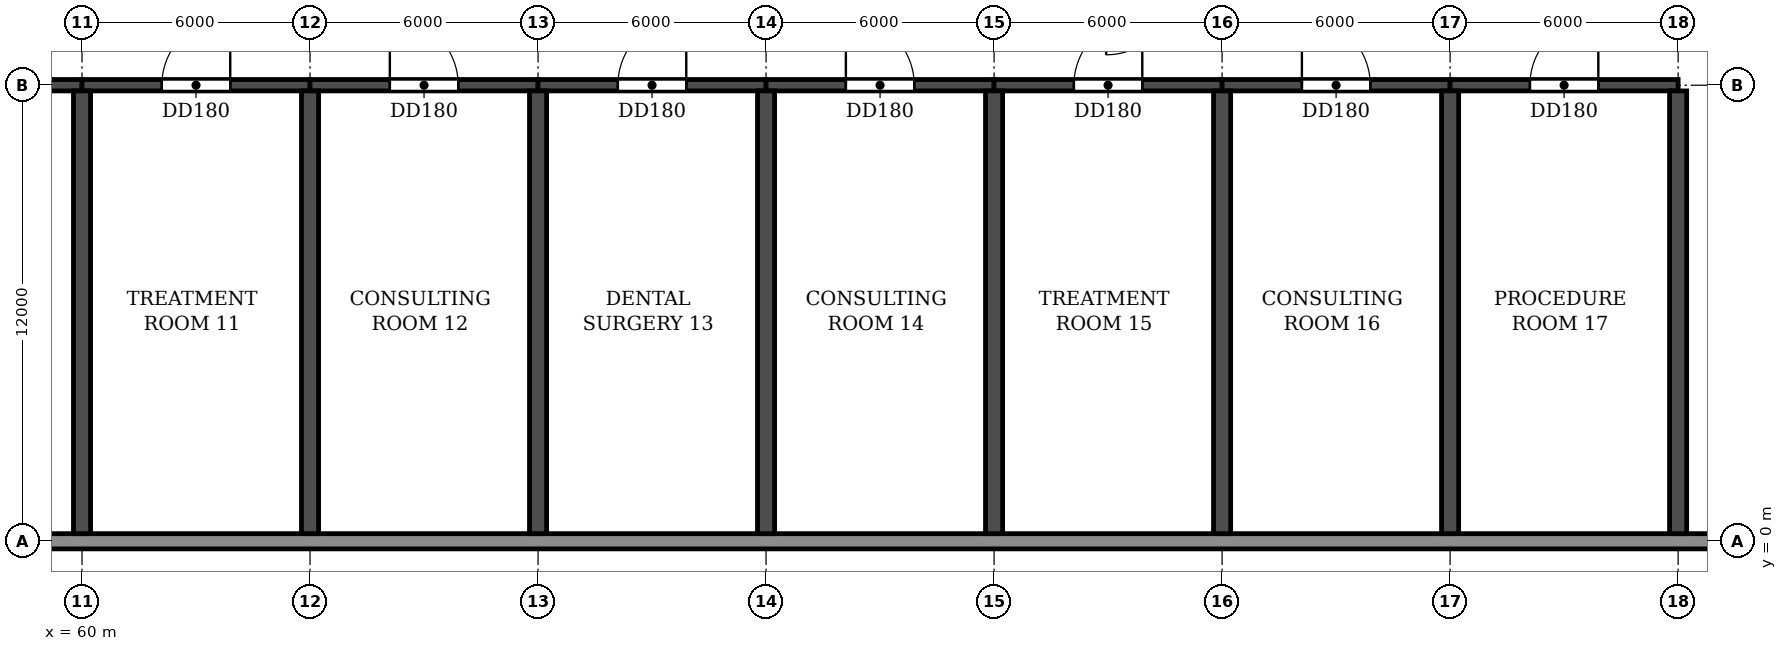
"""IFC4 building model, lengths in metres.
Left out: names, types, materials, properties, quantities, classifications, styles, units other than length and angle.
Written with IfcOpenShell. Run it as: python <this file> out.ifc"""

import sys

from ifc_helpers import new_model, si_unit, direction, frame, frame_2d, origin, place, context, subcontext, project, spatial, rectangle, extrude, element, fill, save


model = new_model("IFC4")
c1 = context("Model", 3, precision=1e-05, world=origin(), true_north=direction((0.0, 1.0)))
c2 = subcontext(c1, "Body", "Model", "MODEL_VIEW")
j1 = project(units=[si_unit("LENGTHUNIT", "METRE"), si_unit("PLANEANGLEUNIT", "RADIAN")], contexts=[c1])
p1 = place(None, origin())
s1 = spatial("IfcSite", under=j1, at=p1, CompositionType="ELEMENT")
p2 = place(p1, origin())
s2 = spatial("IfcBuilding", under=s1, at=p2, CompositionType="ELEMENT")
p3 = place(p2, frame((0.0, 0.0, 6.0)))
s3 = spatial("IfcBuildingStorey", under=s2, at=p3, CompositionType="ELEMENT", Elevation=6.0)
for number, where, z_axis, x_axis in (
    (1, (60.0, 0.2, 0.0), (0.0, 0.0, 1.0), (0.0, 1.0, 0.0)),
    (2, (66.0, 0.2, 0.0), (0.0, 0.0, 1.0), (0.0, 1.0, 0.0)),
    (3, (72.0, 0.2, 0.0), (0.0, 0.0, 1.0), (0.0, 1.0, 0.0)),
    (4, (78.0, 0.2, 0.0), (0.0, 0.0, 1.0), (0.0, 1.0, 0.0)),
    (5, (84.0, 0.2, 0.0), (0.0, 0.0, 1.0), (0.0, 1.0, 0.0)),
    (6, (90.0, 0.2, 0.0), (0.0, 0.0, 1.0), (0.0, 1.0, 0.0)),
    (7, (96.0, 0.2, 0.0), (0.0, 0.0, 1.0), (0.0, 1.0, 0.0)),
    (8, (102.0, 0.2, 0.0), (0.0, 0.0, 1.0), (0.0, 1.0, 0.0)),
):
    element("IfcWall", number, at=place(p3, frame(where, z_axis=z_axis, x_axis=x_axis)), inside=s3, PredefinedType="SHEAR", context=c2, shape_type="SweptSolid", body=[
        extrude(rectangle(XDim=11.65, YDim=0.45, at=frame_2d((5.825, 0.0))), origin(), (0.0, 0.0, 1.0), 4.52),
    ])
p4 = place(p3, frame((54.0, 12.0, 0.0), z_axis=(0.0, 0.0, 1.0), x_axis=(1.0, 0.0, 0.0)))
e9 = element("IfcWall", 9, at=p4, inside=s3, PredefinedType="SHEAR", context=c2, shape_type="SweptSolid", body=[
    extrude(rectangle(XDim=6.0, YDim=0.3, at=frame_2d((3.0, 0.0))), origin(), (0.0, 0.0, 1.0), 3.92),
])
p5 = place(p4, frame((2.1, 0.0, 0.0)))
e10 = element("IfcOpeningElement", 10, at=p5, cuts=e9, PredefinedType="OPENING", context=c2, shape_type="SweptSolid", body=[
    extrude(rectangle(XDim=1.8, YDim=2.1, at=frame_2d((0.9, 1.05))), frame((0.0, 0.16, 0.0), z_axis=(0.0, -1.0, 0.0), x_axis=(1.0, 0.0, 0.0)), (0.0, 0.0, 1.0), 0.32),
])
p6 = place(p3, frame((60.0, 12.0, 0.0), z_axis=(0.0, 0.0, 1.0), x_axis=(1.0, 0.0, 0.0)))
e11 = element("IfcWall", 11, at=p6, inside=s3, PredefinedType="SHEAR", context=c2, shape_type="SweptSolid", body=[
    extrude(rectangle(XDim=6.0, YDim=0.3, at=frame_2d((3.0, 0.0))), origin(), (0.0, 0.0, 1.0), 3.92),
])
p7 = place(p6, frame((2.1, 0.0, 0.0)))
e12 = element("IfcOpeningElement", 12, at=p7, cuts=e11, PredefinedType="OPENING", context=c2, shape_type="SweptSolid", body=[
    extrude(rectangle(XDim=1.8, YDim=2.1, at=frame_2d((0.9, 1.05))), frame((0.0, 0.16, 0.0), z_axis=(0.0, -1.0, 0.0), x_axis=(1.0, 0.0, 0.0)), (0.0, 0.0, 1.0), 0.32),
])
p8 = place(p3, frame((66.0, 12.0, 0.0), z_axis=(0.0, 0.0, 1.0), x_axis=(1.0, 0.0, 0.0)))
e13 = element("IfcWall", 13, at=p8, inside=s3, PredefinedType="SHEAR", context=c2, shape_type="SweptSolid", body=[
    extrude(rectangle(XDim=6.0, YDim=0.3, at=frame_2d((3.0, 0.0))), origin(), (0.0, 0.0, 1.0), 3.92),
])
p9 = place(p8, frame((2.1, 0.0, 0.0)))
e14 = element("IfcOpeningElement", 14, at=p9, cuts=e13, PredefinedType="OPENING", context=c2, shape_type="SweptSolid", body=[
    extrude(rectangle(XDim=1.8, YDim=2.1, at=frame_2d((0.9, 1.05))), frame((0.0, 0.16, 0.0), z_axis=(0.0, -1.0, 0.0), x_axis=(1.0, 0.0, 0.0)), (0.0, 0.0, 1.0), 0.32),
])
p10 = place(p3, frame((72.0, 12.0, 0.0), z_axis=(0.0, 0.0, 1.0), x_axis=(1.0, 0.0, 0.0)))
e15 = element("IfcWall", 15, at=p10, inside=s3, PredefinedType="SHEAR", context=c2, shape_type="SweptSolid", body=[
    extrude(rectangle(XDim=6.0, YDim=0.3, at=frame_2d((3.0, 0.0))), origin(), (0.0, 0.0, 1.0), 3.92),
])
p11 = place(p10, frame((2.1, 0.0, 0.0)))
e16 = element("IfcOpeningElement", 16, at=p11, cuts=e15, PredefinedType="OPENING", context=c2, shape_type="SweptSolid", body=[
    extrude(rectangle(XDim=1.8, YDim=2.1, at=frame_2d((0.9, 1.05))), frame((0.0, 0.16, 0.0), z_axis=(0.0, -1.0, 0.0), x_axis=(1.0, 0.0, 0.0)), (0.0, 0.0, 1.0), 0.32),
])
p12 = place(p3, frame((78.0, 12.0, 0.0), z_axis=(0.0, 0.0, 1.0), x_axis=(1.0, 0.0, 0.0)))
e17 = element("IfcWall", 17, at=p12, inside=s3, PredefinedType="SHEAR", context=c2, shape_type="SweptSolid", body=[
    extrude(rectangle(XDim=6.0, YDim=0.3, at=frame_2d((3.0, 0.0))), origin(), (0.0, 0.0, 1.0), 3.92),
])
p13 = place(p12, frame((2.1, 0.0, 0.0)))
e18 = element("IfcOpeningElement", 18, at=p13, cuts=e17, PredefinedType="OPENING", context=c2, shape_type="SweptSolid", body=[
    extrude(rectangle(XDim=1.8, YDim=2.1, at=frame_2d((0.9, 1.05))), frame((0.0, 0.16, 0.0), z_axis=(0.0, -1.0, 0.0), x_axis=(1.0, 0.0, 0.0)), (0.0, 0.0, 1.0), 0.32),
])
p14 = place(p3, frame((84.0, 12.0, 0.0), z_axis=(0.0, 0.0, 1.0), x_axis=(1.0, 0.0, 0.0)))
e19 = element("IfcWall", 19, at=p14, inside=s3, PredefinedType="SHEAR", context=c2, shape_type="SweptSolid", body=[
    extrude(rectangle(XDim=6.0, YDim=0.3, at=frame_2d((3.0, 0.0))), origin(), (0.0, 0.0, 1.0), 3.92),
])
p15 = place(p14, frame((2.1, 0.0, 0.0)))
e20 = element("IfcOpeningElement", 20, at=p15, cuts=e19, PredefinedType="OPENING", context=c2, shape_type="SweptSolid", body=[
    extrude(rectangle(XDim=1.8, YDim=2.1, at=frame_2d((0.9, 1.05))), frame((0.0, 0.16, 0.0), z_axis=(0.0, -1.0, 0.0), x_axis=(1.0, 0.0, 0.0)), (0.0, 0.0, 1.0), 0.32),
])
p16 = place(p3, frame((90.0, 12.0, 0.0), z_axis=(0.0, 0.0, 1.0), x_axis=(1.0, 0.0, 0.0)))
e21 = element("IfcWall", 21, at=p16, inside=s3, PredefinedType="SHEAR", context=c2, shape_type="SweptSolid", body=[
    extrude(rectangle(XDim=6.0, YDim=0.3, at=frame_2d((3.0, 0.0))), origin(), (0.0, 0.0, 1.0), 3.92),
])
p17 = place(p16, frame((2.1, 0.0, 0.0)))
e22 = element("IfcOpeningElement", 22, at=p17, cuts=e21, PredefinedType="OPENING", context=c2, shape_type="SweptSolid", body=[
    extrude(rectangle(XDim=1.8, YDim=2.1, at=frame_2d((0.9, 1.05))), frame((0.0, 0.16, 0.0), z_axis=(0.0, -1.0, 0.0), x_axis=(1.0, 0.0, 0.0)), (0.0, 0.0, 1.0), 0.32),
])
p18 = place(p3, frame((96.0, 12.0, 0.0), z_axis=(0.0, 0.0, 1.0), x_axis=(1.0, 0.0, 0.0)))
e23 = element("IfcWall", 23, at=p18, inside=s3, PredefinedType="SHEAR", context=c2, shape_type="SweptSolid", body=[
    extrude(rectangle(XDim=6.0, YDim=0.3, at=frame_2d((3.0, 0.0))), origin(), (0.0, 0.0, 1.0), 3.92),
])
p19 = place(p18, frame((2.1, 0.0, 0.0)))
e24 = element("IfcOpeningElement", 24, at=p19, cuts=e23, PredefinedType="OPENING", context=c2, shape_type="SweptSolid", body=[
    extrude(rectangle(XDim=1.8, YDim=2.1, at=frame_2d((0.9, 1.05))), frame((0.0, 0.16, 0.0), z_axis=(0.0, -1.0, 0.0), x_axis=(1.0, 0.0, 0.0)), (0.0, 0.0, 1.0), 0.32),
])
p20 = place(p3, frame((-3.0, 0.0, 0.0), z_axis=(0.0, 0.0, 1.0), x_axis=(1.0, 0.0, 0.0)))
e25 = element("IfcWall", 25, at=p20, inside=s3, PredefinedType="STANDARD", context=c2, shape_type="SweptSolid", body=[
    extrude(rectangle(XDim=108.0, YDim=0.4, at=frame_2d((54.0, 0.0))), origin(), (0.0, 0.0, 1.0), 4.52),
])
p21 = place(p7, origin())
e26 = element("IfcDoor", 26, at=p21, inside=s3, OperationType="DOUBLE_DOOR_SINGLE_SWING", PredefinedType="DOOR", context=c2, shape_type="SweptSolid", body=[
    extrude(rectangle(XDim=1.8, YDim=2.1, at=frame_2d((0.9, 1.05))), frame((0.0, 0.025, 0.0), z_axis=(0.0, -1.0, 0.0), x_axis=(1.0, 0.0, 0.0)), (0.0, 0.0, 1.0), 0.05),
])
fill(e12, e26)
p22 = place(p9, origin())
e27 = element("IfcDoor", 27, at=p22, inside=s3, OperationType="DOUBLE_DOOR_SINGLE_SWING", PredefinedType="DOOR", context=c2, shape_type="SweptSolid", body=[
    extrude(rectangle(XDim=1.8, YDim=2.1, at=frame_2d((0.9, 1.05))), frame((0.0, 0.025, 0.0), z_axis=(0.0, -1.0, 0.0), x_axis=(1.0, 0.0, 0.0)), (0.0, 0.0, 1.0), 0.05),
])
fill(e14, e27)
p23 = place(p11, origin())
e28 = element("IfcDoor", 28, at=p23, inside=s3, OperationType="DOUBLE_DOOR_SINGLE_SWING", PredefinedType="DOOR", context=c2, shape_type="SweptSolid", body=[
    extrude(rectangle(XDim=1.8, YDim=2.1, at=frame_2d((0.9, 1.05))), frame((0.0, 0.025, 0.0), z_axis=(0.0, -1.0, 0.0), x_axis=(1.0, 0.0, 0.0)), (0.0, 0.0, 1.0), 0.05),
])
fill(e16, e28)
p24 = place(p13, origin())
e29 = element("IfcDoor", 29, at=p24, inside=s3, OperationType="DOUBLE_DOOR_SINGLE_SWING", PredefinedType="DOOR", context=c2, shape_type="SweptSolid", body=[
    extrude(rectangle(XDim=1.8, YDim=2.1, at=frame_2d((0.9, 1.05))), frame((0.0, 0.025, 0.0), z_axis=(0.0, -1.0, 0.0), x_axis=(1.0, 0.0, 0.0)), (0.0, 0.0, 1.0), 0.05),
])
fill(e18, e29)
p25 = place(p15, origin())
e30 = element("IfcDoor", 30, at=p25, inside=s3, OperationType="DOUBLE_DOOR_SINGLE_SWING", PredefinedType="DOOR", context=c2, shape_type="SweptSolid", body=[
    extrude(rectangle(XDim=1.8, YDim=2.1, at=frame_2d((0.9, 1.05))), frame((0.0, 0.025, 0.0), z_axis=(0.0, -1.0, 0.0), x_axis=(1.0, 0.0, 0.0)), (0.0, 0.0, 1.0), 0.05),
])
fill(e20, e30)
p26 = place(p17, origin())
e31 = element("IfcDoor", 31, at=p26, inside=s3, OperationType="DOUBLE_DOOR_SINGLE_SWING", PredefinedType="DOOR", context=c2, shape_type="SweptSolid", body=[
    extrude(rectangle(XDim=1.8, YDim=2.1, at=frame_2d((0.9, 1.05))), frame((0.0, 0.025, 0.0), z_axis=(0.0, -1.0, 0.0), x_axis=(1.0, 0.0, 0.0)), (0.0, 0.0, 1.0), 0.05),
])
fill(e22, e31)
p27 = place(p19, origin())
e32 = element("IfcDoor", 32, at=p27, inside=s3, OperationType="DOUBLE_DOOR_SINGLE_SWING", PredefinedType="DOOR", context=c2, shape_type="SweptSolid", body=[
    extrude(rectangle(XDim=1.8, YDim=2.1, at=frame_2d((0.9, 1.05))), frame((0.0, 0.025, 0.0), z_axis=(0.0, -1.0, 0.0), x_axis=(1.0, 0.0, 0.0)), (0.0, 0.0, 1.0), 0.05),
])
fill(e24, e32)
save(model, sys.argv[1])
